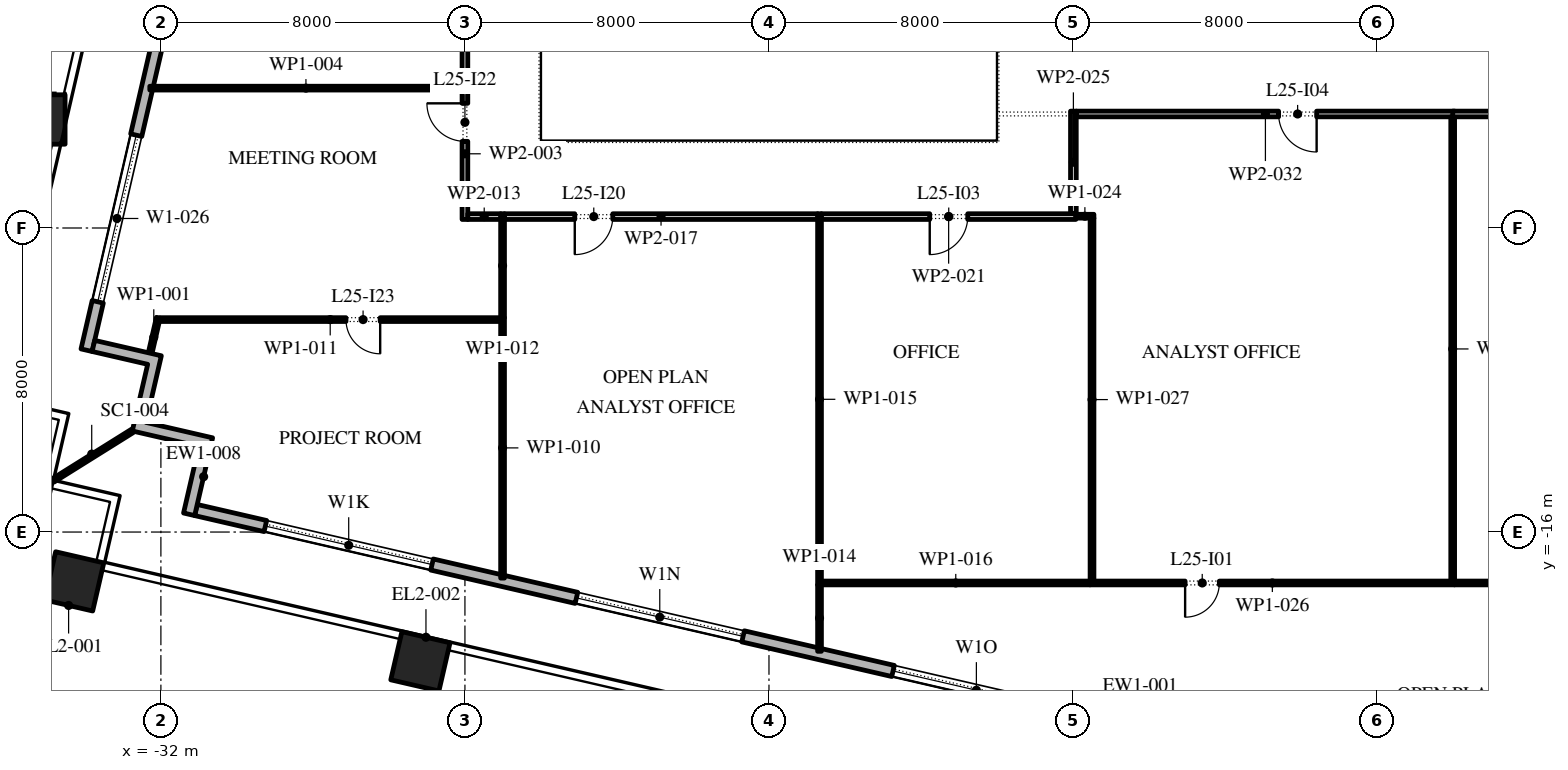
"""IFC4 building model, lengths in metres.
Left out: names, types, materials, properties, quantities, classifications, styles, units other than length and angle.
Written with IfcOpenShell. Run it as: python <this file> out.ifc"""

import sys

from ifc_helpers import new_model, si_unit, direction, frame, frame_2d, origin, origin_2d, place, context, subcontext, project, spatial, polyline, rectangle, outline, extrude, element, fill, save


model = new_model("IFC4")
c1 = context("Model", 3, precision=1e-05, world=origin(), true_north=direction((0.0, 1.0)))
c2 = subcontext(c1, "Body", "Model", "MODEL_VIEW")
j1 = project(units=[si_unit("LENGTHUNIT", "METRE"), si_unit("PLANEANGLEUNIT", "RADIAN")], contexts=[c1])
p1 = place(None, origin())
s1 = spatial("IfcSite", under=j1, at=p1, CompositionType="ELEMENT")
p2 = place(p1, origin())
s2 = spatial("IfcBuilding", under=s1, at=p2, CompositionType="ELEMENT")
p3 = place(p2, frame((0.0, 0.0, 118.2)))
s3 = spatial("IfcBuildingStorey", under=s2, at=p3, CompositionType="ELEMENT", Elevation=118.2)
for number, where, z_axis, x_axis in (
    (1, (-34.282, -17.298, 0.0), (0.0, 0.0, 1.0), (0.974, -0.225, 0.0)),
    (2, (-25.172, -19.402, 0.0), (0.0, 0.0, 1.0), (0.974, -0.225, 0.0)),
):
    element("IfcColumn", number, at=place(p3, frame(where, z_axis=z_axis, x_axis=x_axis)), inside=s3, PredefinedType="COLUMN", context=c2, shape_type="SweptSolid", body=[
        extrude(rectangle(XDim=1.3, YDim=1.3, at=origin_2d()), origin(), (0.0, 0.0, 1.0), 4.2),
    ])
p4 = place(p3, frame((-35.171, -5.145, 0.0), z_axis=(0.002906226325, 0.012613022249, 0.99991622925), x_axis=(-0.974466825284, 0.224531526563, 0.0)))
e3 = element("IfcColumn", 3, at=p4, inside=s3, PredefinedType="COLUMN", context=c2, shape_type="SweptSolid", body=[
    extrude(rectangle(XDim=1.3, YDim=1.3, at=origin_2d()), origin(), (0.0, 0.0, 1.0), 4.2),
])
p5 = place(p3, frame((-35.631, -15.139, 0.0), z_axis=(0.0, 0.0, 1.0), x_axis=(0.974370064785, -0.224951054344, 0.0)))
e4 = element("IfcColumn", 4, at=p5, inside=s3, PredefinedType="COLUMN", context=c2, shape_type="SweptSolid", body=[
    extrude(rectangle(XDim=1.3, YDim=1.3, at=origin_2d()), origin(), (0.0, 0.0, 1.0), 4.2),
])
p6 = place(p3, frame((-31.078, -15.421, 0.0), z_axis=(0.0, 0.0, 1.0), x_axis=(0.974370456532, -0.224949357493, 0.0)))
e5 = element("IfcWall", 5, at=p6, inside=s3, PredefinedType="STANDARD", context=c2, shape_type="SweptSolid", body=[
    extrude(rectangle(XDim=51.0, YDim=0.3, at=frame_2d((25.5, 0.0))), origin(), (0.0, 0.0, 1.0), 4.0),
])
p7 = place(p6, frame((1.875, 0.0, 0.45)))
e6 = element("IfcOpeningElement", 6, at=p7, cuts=e5, PredefinedType="OPENING", context=c2, shape_type="SweptSolid", body=[
    extrude(rectangle(XDim=4.5, YDim=2.65, at=frame_2d((2.25, 1.325))), frame((0.0, 0.16, 0.0), z_axis=(0.0, -1.0, 0.0), x_axis=(1.0, 0.0, 0.0)), (0.0, 0.0, 1.0), 0.32),
])
p8 = place(p6, frame((10.275, 0.0, 0.45)))
e7 = element("IfcOpeningElement", 7, at=p8, cuts=e5, PredefinedType="OPENING", context=c2, shape_type="SweptSolid", body=[
    extrude(rectangle(XDim=4.5, YDim=2.525, at=frame_2d((2.25, 1.262))), frame((0.0, 0.16, 0.0), z_axis=(0.0, -1.0, 0.0), x_axis=(1.0, 0.0, 0.0)), (0.0, 0.0, 1.0), 0.32),
])
p9 = place(p6, frame((18.825, 0.0, 0.45)))
e8 = element("IfcOpeningElement", 8, at=p9, cuts=e5, PredefinedType="OPENING", context=c2, shape_type="SweptSolid", body=[
    extrude(rectangle(XDim=4.5, YDim=2.5, at=frame_2d((2.25, 1.25))), frame((0.0, 0.16, 0.0), z_axis=(0.0, -1.0, 0.0), x_axis=(1.0, 0.0, 0.0)), (0.0, 0.0, 1.0), 0.32),
])
p10 = place(p6, frame((28.425, 0.0, 0.0)))
e9 = element("IfcOpeningElement", 9, at=p10, cuts=e5, PredefinedType="OPENING", context=c2, shape_type="SweptSolid", body=[
    extrude(rectangle(XDim=2.4, YDim=2.9, at=frame_2d((1.2, 1.45))), frame((0.0, 0.16, 0.0), z_axis=(0.0, -1.0, 0.0), x_axis=(1.0, 0.0, 0.0)), (0.0, 0.0, 1.0), 0.32),
])
p11 = place(p6, frame((35.925, 0.0, 0.45)))
e10 = element("IfcOpeningElement", 10, at=p11, cuts=e5, PredefinedType="OPENING", context=c2, shape_type="SweptSolid", body=[
    extrude(rectangle(XDim=4.5, YDim=2.45, at=frame_2d((2.25, 1.225))), frame((0.0, 0.16, 0.0), z_axis=(0.0, -1.0, 0.0), x_axis=(1.0, 0.0, 0.0)), (0.0, 0.0, 1.0), 0.32),
])
p12 = place(p6, frame((44.475, 0.0, 0.45)))
e11 = element("IfcOpeningElement", 11, at=p12, cuts=e5, PredefinedType="OPENING", context=c2, shape_type="SweptSolid", body=[
    extrude(rectangle(XDim=4.5, YDim=2.45, at=frame_2d((2.25, 1.225))), frame((0.0, 0.16, 0.0), z_axis=(0.0, -1.0, 0.0), x_axis=(1.0, 0.0, 0.0)), (0.0, 0.0, 1.0), 0.32),
])
p13 = place(p3, frame((-22.82, 37.016, 0.0), z_axis=(0.0, 0.0, 1.0), x_axis=(-0.224953880882, -0.974369412223, 0.0)))
e12 = element("IfcWall", 12, at=p13, inside=s3, PredefinedType="STANDARD", context=c2, shape_type="SweptSolid", body=[
    extrude(rectangle(XDim=49.5, YDim=0.3, at=frame_2d((24.75, 0.0))), origin(), (0.0, 0.0, 1.0), 4.0),
])
p14 = place(p13, frame((1.157, 0.0, 0.45)))
e13 = element("IfcOpeningElement", 13, at=p14, cuts=e12, PredefinedType="OPENING", context=c2, shape_type="SweptSolid", body=[
    extrude(rectangle(XDim=4.5, YDim=3.05, at=frame_2d((2.25, 1.525))), frame((0.0, 0.16, 0.0), z_axis=(0.0, -1.0, 0.0), x_axis=(1.0, 0.0, 0.0)), (0.0, 0.0, 1.0), 0.32),
])
p15 = place(p13, frame((8.121, 0.0, 0.45)))
e14 = element("IfcOpeningElement", 14, at=p15, cuts=e12, PredefinedType="OPENING", context=c2, shape_type="SweptSolid", body=[
    extrude(rectangle(XDim=4.5, YDim=3.05, at=frame_2d((2.25, 1.525))), frame((0.0, 0.16, 0.0), z_axis=(0.0, -1.0, 0.0), x_axis=(1.0, 0.0, 0.0)), (0.0, 0.0, 1.0), 0.32),
])
p16 = place(p13, frame((15.236, 0.0, 0.45)))
e15 = element("IfcOpeningElement", 15, at=p16, cuts=e12, PredefinedType="OPENING", context=c2, shape_type="SweptSolid", body=[
    extrude(rectangle(XDim=4.5, YDim=3.05, at=frame_2d((2.25, 1.525))), frame((0.0, 0.16, 0.0), z_axis=(0.0, -1.0, 0.0), x_axis=(1.0, 0.0, 0.0)), (0.0, 0.0, 1.0), 0.32),
])
p17 = place(p13, frame((23.4, 0.0, 0.0)))
e16 = element("IfcOpeningElement", 16, at=p17, cuts=e12, PredefinedType="OPENING", context=c2, shape_type="SweptSolid", body=[
    extrude(rectangle(XDim=2.4, YDim=3.5, at=frame_2d((1.2, 1.75))), frame((0.0, 0.16, 0.0), z_axis=(0.0, -1.0, 0.0), x_axis=(1.0, 0.0, 0.0)), (0.0, 0.0, 1.0), 0.32),
])
p18 = place(p13, frame((29.464, 0.0, 0.45)))
e17 = element("IfcOpeningElement", 17, at=p18, cuts=e12, PredefinedType="OPENING", context=c2, shape_type="SweptSolid", body=[
    extrude(rectangle(XDim=4.5, YDim=2.875, at=frame_2d((2.25, 1.438))), frame((0.0, 0.16, 0.0), z_axis=(0.0, -1.0, 0.0), x_axis=(1.0, 0.0, 0.0)), (0.0, 0.0, 1.0), 0.32),
])
p19 = place(p13, frame((36.579, 0.0, 0.45)))
e18 = element("IfcOpeningElement", 18, at=p19, cuts=e12, PredefinedType="OPENING", context=c2, shape_type="SweptSolid", body=[
    extrude(rectangle(XDim=4.5, YDim=2.675, at=frame_2d((2.25, 1.337))), frame((0.0, 0.16, 0.0), z_axis=(0.0, -1.0, 0.0), x_axis=(1.0, 0.0, 0.0)), (0.0, 0.0, 1.0), 0.32),
])
p20 = place(p13, frame((43.693, 0.0, 0.45)))
e19 = element("IfcOpeningElement", 19, at=p20, cuts=e12, PredefinedType="OPENING", context=c2, shape_type="SweptSolid", body=[
    extrude(rectangle(XDim=4.5, YDim=3.05, at=frame_2d((2.25, 1.525))), frame((0.0, 0.16, 0.0), z_axis=(0.0, -1.0, 0.0), x_axis=(1.0, 0.0, 0.0)), (0.0, 0.0, 1.0), 0.32),
])
p21 = place(p3, origin())
e20 = element("IfcWall", 20, at=p21, inside=s3, PredefinedType="STANDARD", context=c2, shape_type="SweptSolid", body=[
    extrude(outline(polyline([(-32.393, -13.116), (-30.639, -13.521), (-31.111, -15.567), (-31.404, -15.5), (-30.999, -13.746), (-32.753, -13.341), (-32.348, -11.587), (-33.809, -11.25), (-33.742, -10.957), (-31.988, -11.362), (-32.393, -13.116)])), origin(), (0.0, 0.0, 1.0), 4.0),
])
p22 = place(p3, frame((-32.753, -13.341, -0.05), z_axis=(0.0, 0.0, 1.0), x_axis=(-0.848059759764, -0.529900598103, 0.0)))
e21 = element("IfcWall", 21, at=p22, inside=s3, PredefinedType="STANDARD", context=c2, shape_type="SweptSolid", body=[
    extrude(rectangle(XDim=2.455, YDim=0.1, at=frame_2d((1.228, 0.0))), origin(), (0.0, 0.0, 1.0), 4.05),
])
p23 = place(p3, frame((-32.069, -10.361, 0.0), z_axis=(0.0, 0.0, 1.0), x_axis=(-0.222987762652, -0.974821243976, 0.0)))
e22 = element("IfcWall", 22, at=p23, inside=s3, PredefinedType="PARTITIONING", context=c2, shape_type="SweptSolid", body=[
    extrude(rectangle(XDim=1.058, YDim=0.1, at=frame_2d((0.529, 0.0))), origin(), (0.0, 0.0, 1.0), 4.0),
])
p24 = place(p3, frame((-24.0, -7.775, 0.0), z_axis=(0.0, 0.0, 1.0), x_axis=(0.0, 1.0, 0.0)))
e23 = element("IfcWall", 23, at=p24, inside=s3, PredefinedType="PARTITIONING", context=c2, shape_type="SweptSolid", body=[
    extrude(rectangle(XDim=3.455, YDim=0.15, at=frame_2d((1.728, 0.0))), origin(), (0.0, 0.0, 1.0), 4.0),
])
p25 = place(p24, frame((2.055, 0.0, 0.0)))
e24 = element("IfcOpeningElement", 24, at=p25, cuts=e23, PredefinedType="OPENING", context=c2, shape_type="SweptSolid", body=[
    extrude(rectangle(XDim=1.0, YDim=2.1, at=frame_2d((0.5, 1.05))), frame((0.0, 0.085, 0.0), z_axis=(0.0, -1.0, 0.0), x_axis=(1.0, 0.0, 0.0)), (0.0, 0.0, 1.0), 0.17),
])
p26 = place(p3, frame((-24.075, -4.32, 0.0), z_axis=(0.0, 0.0, 1.0), x_axis=(-1.0, 0.0, 0.0)))
e25 = element("IfcWall", 25, at=p26, inside=s3, PredefinedType="PARTITIONING", context=c2, shape_type="SweptSolid", body=[
    extrude(rectangle(XDim=8.217, YDim=0.1, at=frame_2d((4.108, 0.0))), origin(), (0.0, 0.0, 1.0), 4.0),
])
p27 = place(p3, frame((-24.0, -4.32, 0.0), z_axis=(0.0, 0.0, 1.0), x_axis=(0.0, 1.0, 0.0)))
e26 = element("IfcWall", 26, at=p27, inside=s3, PredefinedType="PARTITIONING", context=c2, shape_type="SweptSolid", body=[
    extrude(rectangle(XDim=7.82, YDim=0.15, at=frame_2d((3.91, 0.0))), origin(), (0.0, 0.0, 1.0), 4.0),
])
p28 = place(p27, frame((4.12, 0.0, 0.0)))
e27 = element("IfcOpeningElement", 27, at=p28, cuts=e26, PredefinedType="OPENING", context=c2, shape_type="SweptSolid", body=[
    extrude(rectangle(XDim=1.0, YDim=2.1, at=frame_2d((0.5, 1.05))), frame((0.0, 0.085, 0.0), z_axis=(0.0, -1.0, 0.0), x_axis=(1.0, 0.0, 0.0)), (0.0, 0.0, 1.0), 0.17),
])
p29 = place(p3, frame((-23.01, -17.212, 0.0), z_axis=(0.0, 0.0, 1.0), x_axis=(0.0, 1.0, 0.0)))
e28 = element("IfcWall", 28, at=p29, inside=s3, PredefinedType="PARTITIONING", context=c2, shape_type="SweptSolid", body=[
    extrude(rectangle(XDim=6.852, YDim=0.1, at=frame_2d((3.426, 0.0))), origin(), (0.0, 0.0, 1.0), 4.0),
])
p30 = place(p3, frame((-23.06, -10.41, 0.0), z_axis=(0.0, 0.0, 1.0), x_axis=(-1.0, 0.0, 0.0)))
e29 = element("IfcWall", 29, at=p30, inside=s3, PredefinedType="PARTITIONING", context=c2, shape_type="SweptSolid", body=[
    extrude(rectangle(XDim=8.97, YDim=0.1, at=frame_2d((4.485, 0.0))), origin(), (0.0, 0.0, 1.0), 4.0),
])
p31 = place(p30, frame((3.17, 0.0, 0.0)))
e30 = element("IfcOpeningElement", 30, at=p31, cuts=e29, PredefinedType="OPENING", context=c2, shape_type="SweptSolid", body=[
    extrude(rectangle(XDim=0.9, YDim=2.1, at=frame_2d((0.45, 1.05))), frame((0.0, 0.06, 0.0), z_axis=(0.0, -1.0, 0.0), x_axis=(1.0, 0.0, 0.0)), (0.0, 0.0, 1.0), 0.12),
])
p32 = place(p3, frame((-23.01, -10.36, 0.0), z_axis=(0.0, 0.0, 1.0), x_axis=(0.0, 1.0, 0.0)))
e31 = element("IfcWall", 31, at=p32, inside=s3, PredefinedType="PARTITIONING", context=c2, shape_type="SweptSolid", body=[
    extrude(rectangle(XDim=2.735, YDim=0.1, at=frame_2d((1.368, 0.0))), origin(), (0.0, 0.0, 1.0), 4.0),
])
p33 = place(p3, frame((-23.06, -7.7, 0.0), z_axis=(0.0, 0.0, 1.0), x_axis=(-1.0, 0.0, 0.0)))
e32 = element("IfcWall", 32, at=p33, inside=s3, PredefinedType="PARTITIONING", context=c2, shape_type="SweptSolid", body=[
    extrude(rectangle(XDim=0.865, YDim=0.15, at=frame_2d((0.433, 0.0))), origin(), (0.0, 0.0, 1.0), 4.0),
])
p34 = place(p3, frame((-14.67, -19.138, 0.0), z_axis=(0.0, 0.0, 1.0), x_axis=(0.0, 1.0, 0.0)))
e33 = element("IfcWall", 33, at=p34, inside=s3, PredefinedType="PARTITIONING", context=c2, shape_type="SweptSolid", body=[
    extrude(rectangle(XDim=1.748, YDim=0.1, at=frame_2d((0.874, 0.0))), origin(), (0.0, 0.0, 1.0), 4.0),
])
p35 = place(p3, frame((-14.67, -17.39, 0.0), z_axis=(0.0, 0.0, 1.0), x_axis=(0.0, 1.0, 0.0)))
e34 = element("IfcWall", 34, at=p35, inside=s3, PredefinedType="PARTITIONING", context=c2, shape_type="SweptSolid", body=[
    extrude(rectangle(XDim=9.765, YDim=0.1, at=frame_2d((4.882, 0.0))), origin(), (0.0, 0.0, 1.0), 4.0),
])
p36 = place(p3, frame((-14.62, -17.34, 0.0), z_axis=(0.0, 0.0, 1.0), x_axis=(1.0, 0.0, 0.0)))
e35 = element("IfcWall", 35, at=p36, inside=s3, PredefinedType="PARTITIONING", context=c2, shape_type="SweptSolid", body=[
    extrude(rectangle(XDim=7.07, YDim=0.1, at=frame_2d((3.535, 0.0))), origin(), (0.0, 0.0, 1.0), 4.0),
])
p37 = place(p3, frame((-14.72, -7.7, 0.0), z_axis=(0.0, 0.0, 1.0), x_axis=(-1.0, 0.0, 0.0)))
e36 = element("IfcWall", 36, at=p37, inside=s3, PredefinedType="PARTITIONING", context=c2, shape_type="SweptSolid", body=[
    extrude(rectangle(XDim=8.24, YDim=0.15, at=frame_2d((4.12, 0.0))), origin(), (0.0, 0.0, 1.0), 4.0),
])
p38 = place(p37, frame((5.39, 0.0, 0.0)))
e37 = element("IfcOpeningElement", 37, at=p38, cuts=e36, PredefinedType="OPENING", context=c2, shape_type="SweptSolid", body=[
    extrude(rectangle(XDim=1.0, YDim=2.1, at=frame_2d((0.5, 1.05))), frame((0.0, 0.085, 0.0), z_axis=(0.0, -1.0, 0.0), x_axis=(1.0, 0.0, 0.0)), (0.0, 0.0, 1.0), 0.17),
])
p39 = place(p3, frame((-7.925, -7.7, 0.0), z_axis=(0.0, 0.0, 1.0), x_axis=(-1.0, 0.0, 0.0)))
e38 = element("IfcWall", 38, at=p39, inside=s3, PredefinedType="PARTITIONING", context=c2, shape_type="SweptSolid", body=[
    extrude(rectangle(XDim=6.695, YDim=0.15, at=frame_2d((3.348, 0.0))), origin(), (0.0, 0.0, 1.0), 4.0),
])
p40 = place(p39, frame((2.845, 0.0, 0.0)))
e39 = element("IfcOpeningElement", 39, at=p40, cuts=e38, PredefinedType="OPENING", context=c2, shape_type="SweptSolid", body=[
    extrude(rectangle(XDim=1.0, YDim=2.1, at=frame_2d((0.5, 1.05))), frame((0.0, 0.085, 0.0), z_axis=(0.0, -1.0, 0.0), x_axis=(1.0, 0.0, 0.0)), (0.0, 0.0, 1.0), 0.17),
])
p41 = place(p3, frame((-7.925, -7.69, 0.0), z_axis=(0.0, 0.0, 1.0), x_axis=(1.0, 0.0, 0.0)))
e40 = element("IfcWall", 40, at=p41, inside=s3, PredefinedType="PARTITIONING", context=c2, shape_type="SweptSolid", body=[
    extrude(rectangle(XDim=0.475, YDim=0.1, at=frame_2d((0.238, 0.0))), origin(), (0.0, 0.0, 1.0), 4.0),
])
p42 = place(p3, frame((-7.99, -4.925, 0.0), z_axis=(0.0, 0.0, 1.0), x_axis=(0.0, -1.0, 0.0)))
e41 = element("IfcWall", 41, at=p42, inside=s3, PredefinedType="PARTITIONING", context=c2, shape_type="SweptSolid", body=[
    extrude(rectangle(XDim=2.69, YDim=0.15, at=frame_2d((1.345, 0.0))), origin(), (0.0, 0.0, 1.0), 4.0),
])
p43 = place(p3, frame((-7.55, -17.34, 0.0), z_axis=(0.0, 0.0, 1.0), x_axis=(1.0, 0.0, 0.0)))
e42 = element("IfcWall", 42, at=p43, inside=s3, PredefinedType="PARTITIONING", context=c2, shape_type="SweptSolid", body=[
    extrude(rectangle(XDim=9.59, YDim=0.1, at=frame_2d((4.795, 0.0))), origin(), (0.0, 0.0, 1.0), 4.0),
])
p44 = place(p43, frame((2.5, 0.0, 0.0)))
e43 = element("IfcOpeningElement", 43, at=p44, cuts=e42, PredefinedType="OPENING", context=c2, shape_type="SweptSolid", body=[
    extrude(rectangle(XDim=0.9, YDim=2.1, at=frame_2d((0.45, 1.05))), frame((0.0, 0.06, 0.0), z_axis=(0.0, -1.0, 0.0), x_axis=(1.0, 0.0, 0.0)), (0.0, 0.0, 1.0), 0.12),
])
p45 = place(p3, frame((-7.5, -7.74, 0.0), z_axis=(0.0, 0.0, 1.0), x_axis=(0.0, -1.0, 0.0)))
e44 = element("IfcWall", 44, at=p45, inside=s3, PredefinedType="PARTITIONING", context=c2, shape_type="SweptSolid", body=[
    extrude(rectangle(XDim=9.55, YDim=0.1, at=frame_2d((4.775, 0.0))), origin(), (0.0, 0.0, 1.0), 4.0),
])
p46 = place(p3, frame((2.04, -17.34, 0.0), z_axis=(0.0, 0.0, 1.0), x_axis=(1.0, 0.0, 0.0)))
e45 = element("IfcWall", 45, at=p46, inside=s3, PredefinedType="PARTITIONING", context=c2, shape_type="SweptSolid", body=[
    extrude(rectangle(XDim=8.33, YDim=0.1, at=frame_2d((4.165, 0.0))), origin(), (0.0, 0.0, 1.0), 4.0),
])
p47 = place(p3, frame((2.04, -5.0, 0.0), z_axis=(0.0, 0.0, 1.0), x_axis=(-1.0, 0.0, 0.0)))
e46 = element("IfcWall", 46, at=p47, inside=s3, PredefinedType="PARTITIONING", context=c2, shape_type="SweptSolid", body=[
    extrude(rectangle(XDim=9.955, YDim=0.15, at=frame_2d((4.978, 0.0))), origin(), (0.0, 0.0, 1.0), 4.0),
])
p48 = place(p47, frame((3.63, 0.0, 0.0)))
e47 = element("IfcOpeningElement", 47, at=p48, cuts=e46, PredefinedType="OPENING", context=c2, shape_type="SweptSolid", body=[
    extrude(rectangle(XDim=1.0, YDim=2.1, at=frame_2d((0.5, 1.05))), frame((0.0, 0.085, 0.0), z_axis=(0.0, -1.0, 0.0), x_axis=(1.0, 0.0, 0.0)), (0.0, 0.0, 1.0), 0.17),
])
p49 = place(p3, frame((1.99, -5.075, 0.0), z_axis=(0.0, 0.0, 1.0), x_axis=(0.0, -1.0, 0.0)))
e48 = element("IfcWall", 48, at=p49, inside=s3, PredefinedType="PARTITIONING", context=c2, shape_type="SweptSolid", body=[
    extrude(rectangle(XDim=12.215, YDim=0.1, at=frame_2d((6.107, 0.0))), origin(), (0.0, 0.0, 1.0), 4.0),
])
p50 = place(p3, frame((7.925, -5.0, 0.0), z_axis=(0.0, 0.0, 1.0), x_axis=(-1.0, 0.0, 0.0)))
e49 = element("IfcWall", 49, at=p50, inside=s3, PredefinedType="PARTITIONING", context=c2, shape_type="SweptSolid", body=[
    extrude(rectangle(XDim=5.935, YDim=0.15, at=frame_2d((2.968, 0.0))), origin(), (0.0, 0.0, 1.0), 4.0),
])
p51 = place(p50, frame((2.535, 0.0, 0.0)))
e50 = element("IfcOpeningElement", 50, at=p51, cuts=e49, PredefinedType="OPENING", context=c2, shape_type="SweptSolid", body=[
    extrude(rectangle(XDim=1.0, YDim=2.1, at=frame_2d((0.5, 1.05))), frame((0.0, 0.085, 0.0), z_axis=(0.0, -1.0, 0.0), x_axis=(1.0, 0.0, 0.0)), (0.0, 0.0, 1.0), 0.17),
])
p52 = place(p7, origin())
e51 = element("IfcWindow", 51, at=p52, inside=s3, PartitioningType="DOUBLE_PANEL_VERTICAL", PredefinedType="WINDOW", context=c2, shape_type="SweptSolid", body=[
    extrude(rectangle(XDim=4.5, YDim=2.65, at=frame_2d((2.25, 1.325))), frame((0.0, 0.03, 0.0), z_axis=(0.0, -1.0, 0.0), x_axis=(1.0, 0.0, 0.0)), (0.0, 0.0, 1.0), 0.06),
])
fill(e6, e51)
p53 = place(p8, origin())
e52 = element("IfcWindow", 52, at=p53, inside=s3, PartitioningType="DOUBLE_PANEL_VERTICAL", PredefinedType="WINDOW", context=c2, shape_type="SweptSolid", body=[
    extrude(rectangle(XDim=4.5, YDim=2.525, at=frame_2d((2.25, 1.262))), frame((0.0, 0.03, 0.0), z_axis=(0.0, -1.0, 0.0), x_axis=(1.0, 0.0, 0.0)), (0.0, 0.0, 1.0), 0.06),
])
fill(e7, e52)
p54 = place(p9, origin())
e53 = element("IfcWindow", 53, at=p54, inside=s3, PartitioningType="DOUBLE_PANEL_VERTICAL", PredefinedType="WINDOW", context=c2, shape_type="SweptSolid", body=[
    extrude(rectangle(XDim=4.5, YDim=2.5, at=frame_2d((2.25, 1.25))), frame((0.0, 0.03, 0.0), z_axis=(0.0, -1.0, 0.0), x_axis=(1.0, 0.0, 0.0)), (0.0, 0.0, 1.0), 0.06),
])
fill(e8, e53)
p55 = place(p20, origin())
e54 = element("IfcWindow", 54, at=p55, inside=s3, PartitioningType="DOUBLE_PANEL_VERTICAL", PredefinedType="WINDOW", context=c2, shape_type="SweptSolid", body=[
    extrude(rectangle(XDim=4.5, YDim=3.05, at=frame_2d((2.25, 1.525))), frame((0.0, 0.03, 0.0), z_axis=(0.0, -1.0, 0.0), x_axis=(1.0, 0.0, 0.0)), (0.0, 0.0, 1.0), 0.06),
])
fill(e19, e54)
p56 = place(p44, frame((0.9, 0.0, 0.0), z_axis=(0.0, 0.0, 1.0), x_axis=(-1.0, 0.0, 0.0)))
e55 = element("IfcDoor", 55, at=p56, inside=s3, OperationType="SINGLE_SWING_LEFT", PredefinedType="DOOR", context=c2, shape_type="SweptSolid", body=[
    extrude(rectangle(XDim=0.9, YDim=2.1, at=frame_2d((0.45, 1.05))), frame((0.0, 0.025, 0.0), z_axis=(0.0, -1.0, 0.0), x_axis=(1.0, 0.0, 0.0)), (0.0, 0.0, 1.0), 0.05),
])
fill(e43, e55)
p57 = place(p40, origin())
e56 = element("IfcDoor", 56, at=p57, inside=s3, OperationType="SINGLE_SWING_LEFT", PredefinedType="DOOR", context=c2, shape_type="SweptSolid", body=[
    extrude(rectangle(XDim=1.0, YDim=2.1, at=frame_2d((0.5, 1.05))), frame((0.0, 0.025, 0.0), z_axis=(0.0, -1.0, 0.0), x_axis=(1.0, 0.0, 0.0)), (0.0, 0.0, 1.0), 0.05),
])
fill(e39, e56)
p58 = place(p48, origin())
e57 = element("IfcDoor", 57, at=p58, inside=s3, OperationType="SINGLE_SWING_RIGHT", PredefinedType="DOOR", context=c2, shape_type="SweptSolid", body=[
    extrude(rectangle(XDim=1.0, YDim=2.1, at=frame_2d((0.5, 1.05))), frame((0.0, 0.025, 0.0), z_axis=(0.0, -1.0, 0.0), x_axis=(1.0, 0.0, 0.0)), (0.0, 0.0, 1.0), 0.05),
])
fill(e47, e57)
p59 = place(p38, origin())
e58 = element("IfcDoor", 58, at=p59, inside=s3, OperationType="SINGLE_SWING_LEFT", PredefinedType="DOOR", context=c2, shape_type="SweptSolid", body=[
    extrude(rectangle(XDim=1.0, YDim=2.1, at=frame_2d((0.5, 1.05))), frame((0.0, 0.025, 0.0), z_axis=(0.0, -1.0, 0.0), x_axis=(1.0, 0.0, 0.0)), (0.0, 0.0, 1.0), 0.05),
])
fill(e37, e58)
p60 = place(p25, origin())
e59 = element("IfcDoor", 59, at=p60, inside=s3, OperationType="SINGLE_SWING_LEFT", PredefinedType="DOOR", context=c2, shape_type="SweptSolid", body=[
    extrude(rectangle(XDim=1.0, YDim=2.1, at=frame_2d((0.5, 1.05))), frame((0.0, 0.025, 0.0), z_axis=(0.0, -1.0, 0.0), x_axis=(1.0, 0.0, 0.0)), (0.0, 0.0, 1.0), 0.05),
])
fill(e24, e59)
p61 = place(p31, origin())
e60 = element("IfcDoor", 60, at=p61, inside=s3, OperationType="SINGLE_SWING_RIGHT", PredefinedType="DOOR", context=c2, shape_type="SweptSolid", body=[
    extrude(rectangle(XDim=0.9, YDim=2.1, at=frame_2d((0.45, 1.05))), frame((0.0, 0.025, 0.0), z_axis=(0.0, -1.0, 0.0), x_axis=(1.0, 0.0, 0.0)), (0.0, 0.0, 1.0), 0.05),
])
fill(e30, e60)
save(model, sys.argv[1])
